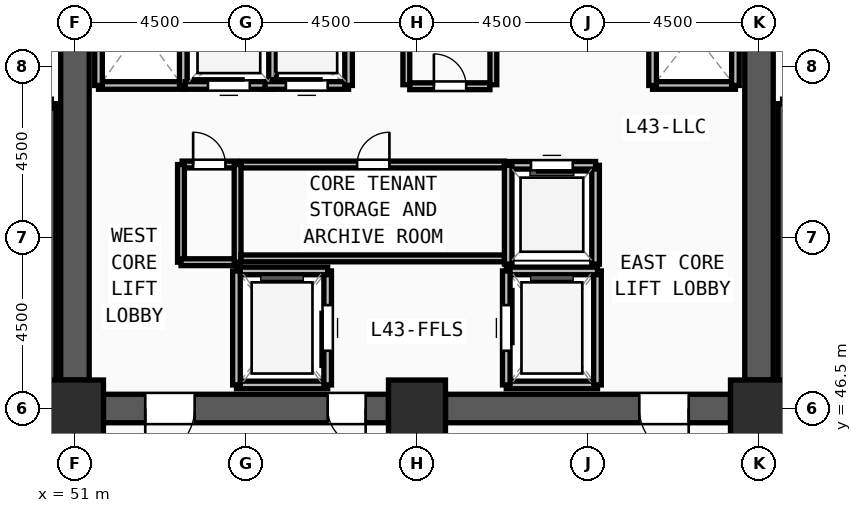
"""IFC4 building model, lengths in metres.
Left out: names, types, materials, properties, quantities, classifications, styles, units other than length and angle.
Written with IfcOpenShell. Run it as: python <this file> out.ifc"""

import sys

from ifc_helpers import new_model, si_unit, direction, frame, frame_2d, origin, origin_2d, place, context, subcontext, project, spatial, rectangle, extrude, source, transform, mapped, element, fill, save


model = new_model("IFC4")
c1 = context("Model", 3, precision=1e-05, world=origin(), true_north=direction((0.0, 1.0)))
c2 = subcontext(c1, "Body", "Model", "MODEL_VIEW")
j1 = project(units=[si_unit("LENGTHUNIT", "METRE"), si_unit("PLANEANGLEUNIT", "RADIAN")], contexts=[c1])
p1 = place(None, origin())
s1 = spatial("IfcSite", under=j1, at=p1, CompositionType="ELEMENT")
p2 = place(p1, origin())
s2 = spatial("IfcBuilding", under=s1, at=p2, CompositionType="ELEMENT")
p3 = place(p2, frame((0.0, 0.0, 166.5)))
s3 = spatial("IfcBuildingStorey", under=s2, at=p3, CompositionType="ELEMENT", Elevation=166.5)
m1 = source(origin(), c2, "Body", "SweptSolid", [
    extrude(rectangle(XDim=1.5, YDim=1.5, at=origin_2d()), origin(), (0.0, 0.0, 1.0), 3.75),
])
for number, where, z_axis, x_axis in (
    (1, (51.0, 46.5, 0.0), (0.0, 0.0, 1.0), (1.0, 0.0, 0.0)),
    (2, (60.0, 46.5, 0.0), (0.0, 0.0, 1.0), (1.0, 0.0, 0.0)),
    (3, (69.0, 46.5, 0.0), (0.0, 0.0, 1.0), (1.0, 0.0, 0.0)),
):
    element("IfcColumn", number, at=place(p3, frame(where, z_axis=z_axis, x_axis=x_axis)), inside=s3, PredefinedType="COLUMN", context=c2, shape_type="MappedRepresentation", body=[
        mapped(m1, transform((0.0, 0.0, 0.0), x_axis=(1.0, 0.0, 0.0), y_axis=(0.0, 1.0, 0.0), z_axis=(0.0, 0.0, 1.0), scale=1.0)),
    ])
p4 = place(p3, frame((69.0, 60.75, 0.0), z_axis=(0.0, 0.0, 1.0), x_axis=(0.0, -1.0, 0.0)))
e4 = element("IfcWall", 4, at=p4, inside=s3, PredefinedType="SHEAR", context=c2, shape_type="SweptSolid", body=[
    extrude(rectangle(XDim=13.5, YDim=0.75, at=frame_2d((6.75, 0.0))), origin(), (0.0, 0.0, 1.0), 3.57),
])
m2 = source(origin(), c2, "Body", "SweptSolid", [
    extrude(rectangle(XDim=1.2, YDim=2.2, at=frame_2d((0.6, 1.1))), frame((0.0, 0.385, 0.0), z_axis=(0.0, -1.0, 0.0), x_axis=(1.0, 0.0, 0.0)), (0.0, 0.0, 1.0), 0.77),
])
p5 = place(p4, frame((1.2, 0.0, 0.0)))
e5 = element("IfcOpeningElement", 5, at=p5, cuts=e4, PredefinedType="OPENING", context=c2, shape_type="MappedRepresentation", body=[
    mapped(m2, transform((0.0, 0.0, 0.0), x_axis=(1.0, 0.0, 0.0), y_axis=(0.0, 1.0, 0.0), z_axis=(0.0, 0.0, 1.0), scale=1.0)),
])
p6 = place(p3, frame((68.25, 46.5, 0.0), z_axis=(0.0, 0.0, 1.0), x_axis=(-1.0, 0.0, 0.0)))
e6 = element("IfcWall", 6, at=p6, inside=s3, PredefinedType="SHEAR", context=c2, shape_type="SweptSolid", body=[
    extrude(rectangle(XDim=7.5, YDim=0.75, at=frame_2d((3.75, 0.0))), origin(), (0.0, 0.0, 1.0), 3.57),
])
m3 = source(origin(), c2, "Body", "SweptSolid", [
    extrude(rectangle(XDim=1.3, YDim=2.2, at=frame_2d((0.65, 1.1))), frame((0.0, 0.385, 0.0), z_axis=(0.0, -1.0, 0.0), x_axis=(1.0, 0.0, 0.0)), (0.0, 0.0, 1.0), 0.77),
])
p7 = place(p6, frame((1.1, 0.0, 0.0)))
e7 = element("IfcOpeningElement", 7, at=p7, cuts=e6, PredefinedType="OPENING", context=c2, shape_type="MappedRepresentation", body=[
    mapped(m3, transform((0.0, 0.0, 0.0), x_axis=(1.0, 0.0, 0.0), y_axis=(0.0, 1.0, 0.0), z_axis=(0.0, 0.0, 1.0), scale=1.0)),
])
p8 = place(p3, frame((59.25, 46.5, 0.0), z_axis=(0.0, 0.0, 1.0), x_axis=(-1.0, 0.0, 0.0)))
e8 = element("IfcWall", 8, at=p8, inside=s3, PredefinedType="SHEAR", context=c2, shape_type="SweptSolid", body=[
    extrude(rectangle(XDim=7.5, YDim=0.75, at=frame_2d((3.75, 0.0))), origin(), (0.0, 0.0, 1.0), 3.57),
])
p9 = place(p8, frame((5.1, 0.0, 0.0)))
e9 = element("IfcOpeningElement", 9, at=p9, cuts=e8, PredefinedType="OPENING", context=c2, shape_type="MappedRepresentation", body=[
    mapped(m3, transform((0.0, 0.0, 0.0), x_axis=(1.0, 0.0, 0.0), y_axis=(0.0, 1.0, 0.0), z_axis=(0.0, 0.0, 1.0), scale=1.0)),
])
m4 = source(origin(), c2, "Body", "SweptSolid", [
    extrude(rectangle(XDim=1.0, YDim=2.2, at=frame_2d((0.5, 1.1))), frame((0.0, 0.385, 0.0), z_axis=(0.0, -1.0, 0.0), x_axis=(1.0, 0.0, 0.0)), (0.0, 0.0, 1.0), 0.77),
])
p10 = place(p8, frame((0.6, 0.0, 0.0)))
e10 = element("IfcOpeningElement", 10, at=p10, cuts=e8, PredefinedType="OPENING", context=c2, shape_type="MappedRepresentation", body=[
    mapped(m4, transform((0.0, 0.0, 0.0), x_axis=(1.0, 0.0, 0.0), y_axis=(0.0, 1.0, 0.0), z_axis=(0.0, 0.0, 1.0), scale=1.0)),
])
p11 = place(p3, frame((51.0, 47.25, 0.0), z_axis=(0.0, 0.0, 1.0), x_axis=(0.0, 1.0, 0.0)))
e11 = element("IfcWall", 11, at=p11, inside=s3, PredefinedType="SHEAR", context=c2, shape_type="SweptSolid", body=[
    extrude(rectangle(XDim=13.5, YDim=0.75, at=frame_2d((6.75, 0.0))), origin(), (0.0, 0.0, 1.0), 3.57),
])
for number, where, z_axis, x_axis in (
    (12, (50.38, 46.7, 0.0), (0.0, 0.0, 1.0), (0.0, 1.0, 0.0)),
    (13, (69.62, 54.52, 0.0), (0.0, 0.0, 1.0), (0.0, -1.0, 0.0)),
):
    element("IfcWall", number, at=place(p3, frame(where, z_axis=z_axis, x_axis=x_axis)), inside=s3, PredefinedType="SOLIDWALL", context=c2, shape_type="SweptSolid", body=[
        extrude(rectangle(XDim=7.82, YDim=0.24, at=frame_2d((3.91, 0.0))), origin(), (0.0, 0.0, 1.0), 3.57),
    ])
p12 = place(p3, frame((55.25, 47.12, 0.0), z_axis=(0.0, 0.0, 1.0), x_axis=(1.0, 0.0, 0.0)))
e14 = element("IfcWall", 14, at=p12, inside=s3, PredefinedType="SOLIDWALL", context=c2, shape_type="SweptSolid", body=[
    extrude(rectangle(XDim=2.4, YDim=0.2, at=frame_2d((1.2, 0.0))), origin(), (0.0, 0.0, 1.0), 3.57),
])
p13 = place(p3, frame((57.65, 47.12, 0.0), z_axis=(0.0, 0.0, 1.0), x_axis=(0.0, 1.0, 0.0)))
e15 = element("IfcWall", 15, at=p13, inside=s3, PredefinedType="SOLIDWALL", context=c2, shape_type="SweptSolid", body=[
    extrude(rectangle(XDim=3.0, YDim=0.2, at=frame_2d((1.5, 0.0))), origin(), (0.0, 0.0, 1.0), 3.57),
])
m5 = source(origin(), c2, "Body", "SweptSolid", [
    extrude(rectangle(XDim=1.2, YDim=2.3, at=frame_2d((0.6, 1.15))), frame((0.0, 0.11, 0.0), z_axis=(0.0, -1.0, 0.0), x_axis=(1.0, 0.0, 0.0)), (0.0, 0.0, 1.0), 0.22),
])
p14 = place(p13, frame((0.9, 0.0, 0.0)))
e16 = element("IfcOpeningElement", 16, at=p14, cuts=e15, PredefinedType="OPENING", context=c2, shape_type="MappedRepresentation", body=[
    mapped(m5, transform((0.0, 0.0, 0.0), x_axis=(1.0, 0.0, 0.0), y_axis=(0.0, 1.0, 0.0), z_axis=(0.0, 0.0, 1.0), scale=1.0)),
])
p15 = place(p3, frame((57.65, 50.12, 0.0), z_axis=(0.0, 0.0, 1.0), x_axis=(-1.0, 0.0, 0.0)))
e17 = element("IfcWall", 17, at=p15, inside=s3, PredefinedType="SOLIDWALL", context=c2, shape_type="SweptSolid", body=[
    extrude(rectangle(XDim=2.4, YDim=0.2, at=frame_2d((1.2, 0.0))), origin(), (0.0, 0.0, 1.0), 3.57),
])
p16 = place(p3, frame((55.25, 50.12, 0.0), z_axis=(0.0, 0.0, 1.0), x_axis=(0.0, -1.0, 0.0)))
e18 = element("IfcWall", 18, at=p16, inside=s3, PredefinedType="SOLIDWALL", context=c2, shape_type="SweptSolid", body=[
    extrude(rectangle(XDim=3.0, YDim=0.2, at=frame_2d((1.5, 0.0))), origin(), (0.0, 0.0, 1.0), 3.57),
])
p17 = place(p3, frame((62.35, 47.12, 0.0), z_axis=(0.0, 0.0, 1.0), x_axis=(1.0, 0.0, 0.0)))
e19 = element("IfcWall", 19, at=p17, inside=s3, PredefinedType="SOLIDWALL", context=c2, shape_type="SweptSolid", body=[
    extrude(rectangle(XDim=2.4, YDim=0.2, at=frame_2d((1.2, 0.0))), origin(), (0.0, 0.0, 1.0), 3.57),
])
p18 = place(p3, frame((64.75, 47.12, 0.0), z_axis=(0.0, 0.0, 1.0), x_axis=(0.0, 1.0, 0.0)))
e20 = element("IfcWall", 20, at=p18, inside=s3, PredefinedType="SOLIDWALL", context=c2, shape_type="SweptSolid", body=[
    extrude(rectangle(XDim=3.0, YDim=0.2, at=frame_2d((1.5, 0.0))), origin(), (0.0, 0.0, 1.0), 3.57),
])
p19 = place(p3, frame((64.75, 50.12, 0.0), z_axis=(0.0, 0.0, 1.0), x_axis=(-1.0, 0.0, 0.0)))
e21 = element("IfcWall", 21, at=p19, inside=s3, PredefinedType="SOLIDWALL", context=c2, shape_type="SweptSolid", body=[
    extrude(rectangle(XDim=2.4, YDim=0.2, at=frame_2d((1.2, 0.0))), origin(), (0.0, 0.0, 1.0), 3.57),
])
p20 = place(p3, frame((62.35, 50.12, 0.0), z_axis=(0.0, 0.0, 1.0), x_axis=(0.0, -1.0, 0.0)))
e22 = element("IfcWall", 22, at=p20, inside=s3, PredefinedType="SOLIDWALL", context=c2, shape_type="SweptSolid", body=[
    extrude(rectangle(XDim=3.0, YDim=0.2, at=frame_2d((1.5, 0.0))), origin(), (0.0, 0.0, 1.0), 3.57),
])
p21 = place(p20, frame((0.9, 0.0, 0.0)))
e23 = element("IfcOpeningElement", 23, at=p21, cuts=e22, PredefinedType="OPENING", context=c2, shape_type="MappedRepresentation", body=[
    mapped(m5, transform((0.0, 0.0, 0.0), x_axis=(1.0, 0.0, 0.0), y_axis=(0.0, 1.0, 0.0), z_axis=(0.0, 0.0, 1.0), scale=1.0)),
])
p22 = place(p3, frame((51.62, 55.0, 0.0), z_axis=(0.0, 0.0, 1.0), x_axis=(1.0, 0.0, 0.0)))
e24 = element("IfcWall", 24, at=p22, inside=s3, PredefinedType="SOLIDWALL", context=c2, shape_type="SweptSolid", body=[
    extrude(rectangle(XDim=2.23, YDim=0.2, at=frame_2d((1.115, 0.0))), origin(), (0.0, 0.0, 1.0), 3.57),
])
for number, where, z_axis, x_axis in (
    (25, (53.85, 55.0, 0.0), (0.0, 0.0, 1.0), (0.0, 1.0, 0.0)),
    (26, (51.62, 58.0, 0.0), (0.0, 0.0, 1.0), (0.0, -1.0, 0.0)),
):
    element("IfcWall", number, at=place(p3, frame(where, z_axis=z_axis, x_axis=x_axis)), inside=s3, PredefinedType="SOLIDWALL", context=c2, shape_type="SweptSolid", body=[
        extrude(rectangle(XDim=3.0, YDim=0.2, at=frame_2d((1.5, 0.0))), origin(), (0.0, 0.0, 1.0), 3.57),
    ])
p23 = place(p3, frame((66.2, 55.0, 0.0), z_axis=(0.0, 0.0, 1.0), x_axis=(1.0, 0.0, 0.0)))
e27 = element("IfcWall", 27, at=p23, inside=s3, PredefinedType="SOLIDWALL", context=c2, shape_type="SweptSolid", body=[
    extrude(rectangle(XDim=2.18, YDim=0.2, at=frame_2d((1.09, 0.0))), origin(), (0.0, 0.0, 1.0), 3.57),
])
for number, where, z_axis, x_axis in (
    (28, (68.38, 55.0, 0.0), (0.0, 0.0, 1.0), (0.0, 1.0, 0.0)),
    (29, (66.2, 57.75, 0.0), (0.0, 0.0, 1.0), (0.0, -1.0, 0.0)),
):
    element("IfcWall", number, at=place(p3, frame(where, z_axis=z_axis, x_axis=x_axis)), inside=s3, PredefinedType="SOLIDWALL", context=c2, shape_type="SweptSolid", body=[
        extrude(rectangle(XDim=2.75, YDim=0.2, at=frame_2d((1.375, 0.0))), origin(), (0.0, 0.0, 1.0), 3.57),
    ])
p24 = place(p3, frame((64.7, 50.3, 0.0), z_axis=(0.0, 0.0, 1.0), x_axis=(0.0, 1.0, 0.0)))
e30 = element("IfcWall", 30, at=p24, inside=s3, PredefinedType="SOLIDWALL", context=c2, shape_type="SweptSolid", body=[
    extrude(rectangle(XDim=2.6, YDim=0.2, at=frame_2d((1.3, 0.0))), origin(), (0.0, 0.0, 1.0), 3.57),
])
p25 = place(p3, frame((64.7, 52.9, 0.0), z_axis=(0.0, 0.0, 1.0), x_axis=(-1.0, 0.0, 0.0)))
e31 = element("IfcWall", 31, at=p25, inside=s3, PredefinedType="SOLIDWALL", context=c2, shape_type="SweptSolid", body=[
    extrude(rectangle(XDim=2.3, YDim=0.2, at=frame_2d((1.15, 0.0))), origin(), (0.0, 0.0, 1.0), 3.57),
])
m6 = source(origin(), c2, "Body", "SweptSolid", [
    extrude(rectangle(XDim=1.1, YDim=2.2, at=frame_2d((0.55, 1.1))), frame((0.0, 0.11, 0.0), z_axis=(0.0, -1.0, 0.0), x_axis=(1.0, 0.0, 0.0)), (0.0, 0.0, 1.0), 0.22),
])
p26 = place(p25, frame((0.6, 0.0, 0.0)))
e32 = element("IfcOpeningElement", 32, at=p26, cuts=e31, PredefinedType="OPENING", context=c2, shape_type="MappedRepresentation", body=[
    mapped(m6, transform((0.0, 0.0, 0.0), x_axis=(1.0, 0.0, 0.0), y_axis=(0.0, 1.0, 0.0), z_axis=(0.0, 0.0, 1.0), scale=1.0)),
])
p27 = place(p3, frame((62.4, 52.9, 0.0), z_axis=(0.0, 0.0, 1.0), x_axis=(0.0, -1.0, 0.0)))
e33 = element("IfcWall", 33, at=p27, inside=s3, PredefinedType="SOLIDWALL", context=c2, shape_type="SweptSolid", body=[
    extrude(rectangle(XDim=2.6, YDim=0.2, at=frame_2d((1.3, 0.0))), origin(), (0.0, 0.0, 1.0), 3.57),
])
p28 = place(p3, frame((53.9, 55.0, 0.0), z_axis=(0.0, 0.0, 1.0), x_axis=(1.0, 0.0, 0.0)))
e34 = element("IfcWall", 34, at=p28, inside=s3, PredefinedType="SOLIDWALL", context=c2, shape_type="SweptSolid", body=[
    extrude(rectangle(XDim=2.3, YDim=0.2, at=frame_2d((1.15, 0.0))), origin(), (0.0, 0.0, 1.0), 3.57),
])
p29 = place(p28, frame((0.6, 0.0, 0.0)))
e35 = element("IfcOpeningElement", 35, at=p29, cuts=e34, PredefinedType="OPENING", context=c2, shape_type="MappedRepresentation", body=[
    mapped(m6, transform((0.0, 0.0, 0.0), x_axis=(1.0, 0.0, 0.0), y_axis=(0.0, 1.0, 0.0), z_axis=(0.0, 0.0, 1.0), scale=1.0)),
])
p30 = place(p3, frame((56.2, 55.0, 0.0), z_axis=(0.0, 0.0, 1.0), x_axis=(0.0, 1.0, 0.0)))
e36 = element("IfcWall", 36, at=p30, inside=s3, PredefinedType="SOLIDWALL", context=c2, shape_type="SweptSolid", body=[
    extrude(rectangle(XDim=2.6, YDim=0.2, at=frame_2d((1.3, 0.0))), origin(), (0.0, 0.0, 1.0), 3.57),
])
p31 = place(p3, frame((56.0, 55.0, 0.0), z_axis=(0.0, 0.0, 1.0), x_axis=(1.0, 0.0, 0.0)))
e37 = element("IfcWall", 37, at=p31, inside=s3, PredefinedType="SOLIDWALL", context=c2, shape_type="SweptSolid", body=[
    extrude(rectangle(XDim=2.2, YDim=0.2, at=frame_2d((1.1, 0.0))), origin(), (0.0, 0.0, 1.0), 3.57),
])
p32 = place(p31, frame((0.55, 0.0, 0.0)))
e38 = element("IfcOpeningElement", 38, at=p32, cuts=e37, PredefinedType="OPENING", context=c2, shape_type="MappedRepresentation", body=[
    mapped(m6, transform((0.0, 0.0, 0.0), x_axis=(1.0, 0.0, 0.0), y_axis=(0.0, 1.0, 0.0), z_axis=(0.0, 0.0, 1.0), scale=1.0)),
])
p33 = place(p3, frame((58.2, 55.0, 0.0), z_axis=(0.0, 0.0, 1.0), x_axis=(0.0, 1.0, 0.0)))
e39 = element("IfcWall", 39, at=p33, inside=s3, PredefinedType="SOLIDWALL", context=c2, shape_type="SweptSolid", body=[
    extrude(rectangle(XDim=2.6, YDim=0.2, at=frame_2d((1.3, 0.0))), origin(), (0.0, 0.0, 1.0), 3.57),
])
p34 = place(p3, frame((55.37, 52.92, 0.0), z_axis=(0.0, 0.0, 1.0), x_axis=(1.0, 0.0, 0.0)))
e40 = element("IfcWall", 40, at=p34, inside=s3, PredefinedType="PARTITIONING", context=c2, shape_type="SweptSolid", body=[
    extrude(rectangle(XDim=6.93, YDim=0.18, at=frame_2d((3.465, 0.0))), origin(), (0.0, 0.0, 1.0), 3.57),
])
m7 = source(origin(), c2, "Body", "SweptSolid", [
    extrude(rectangle(XDim=0.85, YDim=2.1, at=frame_2d((0.425, 1.05))), frame((0.0, 0.1, 0.0), z_axis=(0.0, -1.0, 0.0), x_axis=(1.0, 0.0, 0.0)), (0.0, 0.0, 1.0), 0.2),
])
p35 = place(p34, frame((3.055, 0.0, 0.0)))
e41 = element("IfcOpeningElement", 41, at=p35, cuts=e40, PredefinedType="OPENING", context=c2, shape_type="MappedRepresentation", body=[
    mapped(m7, transform((0.0, 0.0, 0.0), x_axis=(1.0, 0.0, 0.0), y_axis=(0.0, 1.0, 0.0), z_axis=(0.0, 0.0, 1.0), scale=1.0)),
])
p36 = place(p3, frame((59.81, 54.98, 0.0), z_axis=(0.0, 0.0, 1.0), x_axis=(1.0, 0.0, 0.0)))
e42 = element("IfcWall", 42, at=p36, inside=s3, PredefinedType="PARTITIONING", context=c2, shape_type="SweptSolid", body=[
    extrude(rectangle(XDim=2.11, YDim=0.18, at=frame_2d((1.055, 0.0))), origin(), (0.0, 0.0, 1.0), 3.57),
])
p37 = place(p36, frame((0.635, 0.0, 0.0)))
e43 = element("IfcOpeningElement", 43, at=p37, cuts=e42, PredefinedType="OPENING", context=c2, shape_type="MappedRepresentation", body=[
    mapped(m7, transform((0.0, 0.0, 0.0), x_axis=(1.0, 0.0, 0.0), y_axis=(0.0, 1.0, 0.0), z_axis=(0.0, 0.0, 1.0), scale=1.0)),
])
p38 = place(p3, frame((53.82, 52.92, 0.0), z_axis=(0.0, 0.0, 1.0), x_axis=(1.0, 0.0, 0.0)))
e44 = element("IfcWall", 44, at=p38, inside=s3, PredefinedType="PARTITIONING", context=c2, shape_type="SweptSolid", body=[
    extrude(rectangle(XDim=1.43, YDim=0.18, at=frame_2d((0.715, 0.0))), origin(), (0.0, 0.0, 1.0), 3.57),
])
p39 = place(p38, frame((0.29, 0.0, 0.0)))
e45 = element("IfcOpeningElement", 45, at=p39, cuts=e44, PredefinedType="OPENING", context=c2, shape_type="MappedRepresentation", body=[
    mapped(m7, transform((0.0, 0.0, 0.0), x_axis=(1.0, 0.0, 0.0), y_axis=(0.0, 1.0, 0.0), z_axis=(0.0, 0.0, 1.0), scale=1.0)),
])
for number, where, z_axis, x_axis in (
    (46, (59.72, 55.02, 0.0), (0.0, 0.0, 1.0), (0.0, 1.0, 0.0)),
    (47, (62.01, 55.02, 0.0), (0.0, 0.0, 1.0), (0.0, 1.0, 0.0)),
):
    element("IfcWall", number, at=place(p3, frame(where, z_axis=z_axis, x_axis=x_axis)), inside=s3, PredefinedType="PARTITIONING", context=c2, shape_type="SweptSolid", body=[
        extrude(rectangle(XDim=2.88, YDim=0.18, at=frame_2d((1.44, 0.0))), origin(), (0.0, 0.0, 1.0), 3.57),
    ])
p40 = place(p3, frame((53.79, 50.35, 0.0), z_axis=(0.0, 0.0, 1.0), x_axis=(0.0, 1.0, 0.0)))
e48 = element("IfcWall", 48, at=p40, inside=s3, PredefinedType="PARTITIONING", context=c2, shape_type="SweptSolid", body=[
    extrude(rectangle(XDim=2.57, YDim=0.18, at=frame_2d((1.285, 0.0))), origin(), (0.0, 0.0, 1.0), 3.57),
])
p41 = place(p3, frame((53.79, 50.35, 0.0), z_axis=(0.0, 0.0, 1.0), x_axis=(1.0, 0.0, 0.0)))
e49 = element("IfcWall", 49, at=p41, inside=s3, PredefinedType="PARTITIONING", context=c2, shape_type="SweptSolid", body=[
    extrude(rectangle(XDim=1.49, YDim=0.18, at=frame_2d((0.745, 0.0))), origin(), (0.0, 0.0, 1.0), 3.57),
])
p42 = place(p3, frame((55.28, 50.35, 0.0), z_axis=(0.0, 0.0, 1.0), x_axis=(0.0, 1.0, 0.0)))
e50 = element("IfcWall", 50, at=p42, inside=s3, PredefinedType="PARTITIONING", context=c2, shape_type="SweptSolid", body=[
    extrude(rectangle(XDim=2.57, YDim=0.18, at=frame_2d((1.285, 0.0))), origin(), (0.0, 0.0, 1.0), 3.57),
])
p43 = place(p3, frame((55.37, 50.45, 0.0), z_axis=(0.0, 0.0, 1.0), x_axis=(1.0, 0.0, 0.0)))
e51 = element("IfcWall", 51, at=p43, inside=s3, PredefinedType="PARTITIONING", context=c2, shape_type="SweptSolid", body=[
    extrude(rectangle(XDim=6.93, YDim=0.18, at=frame_2d((3.465, 0.0))), origin(), (0.0, 0.0, 1.0), 3.57),
])
m8 = source(origin(), c2, "Body", "SweptSolid", [
    extrude(rectangle(XDim=1.3, YDim=2.2, at=frame_2d((0.65, 1.1))), frame((0.0, 0.025, 0.0), z_axis=(0.0, -1.0, 0.0), x_axis=(1.0, 0.0, 0.0)), (0.0, 0.0, 1.0), 0.05),
])
p44 = place(p9, origin())
e52 = element("IfcDoor", 52, at=p44, inside=s3, OperationType="SINGLE_SWING_RIGHT", PredefinedType="DOOR", context=c2, shape_type="MappedRepresentation", body=[
    mapped(m8, transform((0.0, 0.0, 0.0), x_axis=(1.0, 0.0, 0.0), y_axis=(0.0, 1.0, 0.0), z_axis=(0.0, 0.0, 1.0), scale=1.0)),
])
fill(e9, e52)
m9 = source(origin(), c2, "Body", "SweptSolid", [
    extrude(rectangle(XDim=1.0, YDim=2.2, at=frame_2d((0.5, 1.1))), frame((0.0, 0.025, 0.0), z_axis=(0.0, -1.0, 0.0), x_axis=(1.0, 0.0, 0.0)), (0.0, 0.0, 1.0), 0.05),
])
p45 = place(p10, origin())
e53 = element("IfcDoor", 53, at=p45, inside=s3, OperationType="SINGLE_SWING_LEFT", PredefinedType="DOOR", context=c2, shape_type="MappedRepresentation", body=[
    mapped(m9, transform((0.0, 0.0, 0.0), x_axis=(1.0, 0.0, 0.0), y_axis=(0.0, 1.0, 0.0), z_axis=(0.0, 0.0, 1.0), scale=1.0)),
])
fill(e10, e53)
p46 = place(p7, origin())
e54 = element("IfcDoor", 54, at=p46, inside=s3, OperationType="SINGLE_SWING_LEFT", PredefinedType="DOOR", context=c2, shape_type="MappedRepresentation", body=[
    mapped(m8, transform((0.0, 0.0, 0.0), x_axis=(1.0, 0.0, 0.0), y_axis=(0.0, 1.0, 0.0), z_axis=(0.0, 0.0, 1.0), scale=1.0)),
])
fill(e7, e54)
m10 = source(origin(), c2, "Body", "SweptSolid", [
    extrude(rectangle(XDim=1.2, YDim=2.3, at=frame_2d((0.6, 1.15))), frame((0.0, 0.025, 0.0), z_axis=(0.0, -1.0, 0.0), x_axis=(1.0, 0.0, 0.0)), (0.0, 0.0, 1.0), 0.05),
])
p47 = place(p14, origin())
e55 = element("IfcDoor", 55, at=p47, inside=s3, OperationType="SLIDING_TO_LEFT", PredefinedType="DOOR", context=c2, shape_type="MappedRepresentation", body=[
    mapped(m10, transform((0.0, 0.0, 0.0), x_axis=(1.0, 0.0, 0.0), y_axis=(0.0, 1.0, 0.0), z_axis=(0.0, 0.0, 1.0), scale=1.0)),
])
fill(e16, e55)
p48 = place(p21, origin())
e56 = element("IfcDoor", 56, at=p48, inside=s3, OperationType="SLIDING_TO_LEFT", PredefinedType="DOOR", context=c2, shape_type="MappedRepresentation", body=[
    mapped(m10, transform((0.0, 0.0, 0.0), x_axis=(1.0, 0.0, 0.0), y_axis=(0.0, 1.0, 0.0), z_axis=(0.0, 0.0, 1.0), scale=1.0)),
])
fill(e23, e56)
m11 = source(origin(), c2, "Body", "SweptSolid", [
    extrude(rectangle(XDim=1.1, YDim=2.2, at=frame_2d((0.55, 1.1))), frame((0.0, 0.025, 0.0), z_axis=(0.0, -1.0, 0.0), x_axis=(1.0, 0.0, 0.0)), (0.0, 0.0, 1.0), 0.05),
])
p49 = place(p26, origin())
e57 = element("IfcDoor", 57, at=p49, inside=s3, OperationType="SLIDING_TO_LEFT", PredefinedType="DOOR", context=c2, shape_type="MappedRepresentation", body=[
    mapped(m11, transform((0.0, 0.0, 0.0), x_axis=(1.0, 0.0, 0.0), y_axis=(0.0, 1.0, 0.0), z_axis=(0.0, 0.0, 1.0), scale=1.0)),
])
fill(e32, e57)
p50 = place(p29, origin())
e58 = element("IfcDoor", 58, at=p50, inside=s3, OperationType="SLIDING_TO_LEFT", PredefinedType="DOOR", context=c2, shape_type="MappedRepresentation", body=[
    mapped(m11, transform((0.0, 0.0, 0.0), x_axis=(1.0, 0.0, 0.0), y_axis=(0.0, 1.0, 0.0), z_axis=(0.0, 0.0, 1.0), scale=1.0)),
])
fill(e35, e58)
p51 = place(p32, origin())
e59 = element("IfcDoor", 59, at=p51, inside=s3, OperationType="SLIDING_TO_LEFT", PredefinedType="DOOR", context=c2, shape_type="MappedRepresentation", body=[
    mapped(m11, transform((0.0, 0.0, 0.0), x_axis=(1.0, 0.0, 0.0), y_axis=(0.0, 1.0, 0.0), z_axis=(0.0, 0.0, 1.0), scale=1.0)),
])
fill(e38, e59)
m12 = source(origin(), c2, "Body", "SweptSolid", [
    extrude(rectangle(XDim=0.85, YDim=2.1, at=frame_2d((0.425, 1.05))), frame((0.0, 0.025, 0.0), z_axis=(0.0, -1.0, 0.0), x_axis=(1.0, 0.0, 0.0)), (0.0, 0.0, 1.0), 0.05),
])
p52 = place(p35, origin())
e60 = element("IfcDoor", 60, at=p52, inside=s3, OperationType="SINGLE_SWING_RIGHT", PredefinedType="DOOR", context=c2, shape_type="MappedRepresentation", body=[
    mapped(m12, transform((0.0, 0.0, 0.0), x_axis=(1.0, 0.0, 0.0), y_axis=(0.0, 1.0, 0.0), z_axis=(0.0, 0.0, 1.0), scale=1.0)),
])
fill(e41, e60)
p53 = place(p37, origin())
e61 = element("IfcDoor", 61, at=p53, inside=s3, OperationType="SINGLE_SWING_LEFT", PredefinedType="DOOR", context=c2, shape_type="MappedRepresentation", body=[
    mapped(m12, transform((0.0, 0.0, 0.0), x_axis=(1.0, 0.0, 0.0), y_axis=(0.0, 1.0, 0.0), z_axis=(0.0, 0.0, 1.0), scale=1.0)),
])
fill(e43, e61)
p54 = place(p39, origin())
e62 = element("IfcDoor", 62, at=p54, inside=s3, OperationType="SINGLE_SWING_LEFT", PredefinedType="DOOR", context=c2, shape_type="MappedRepresentation", body=[
    mapped(m12, transform((0.0, 0.0, 0.0), x_axis=(1.0, 0.0, 0.0), y_axis=(0.0, 1.0, 0.0), z_axis=(0.0, 0.0, 1.0), scale=1.0)),
])
fill(e45, e62)
save(model, sys.argv[1])
